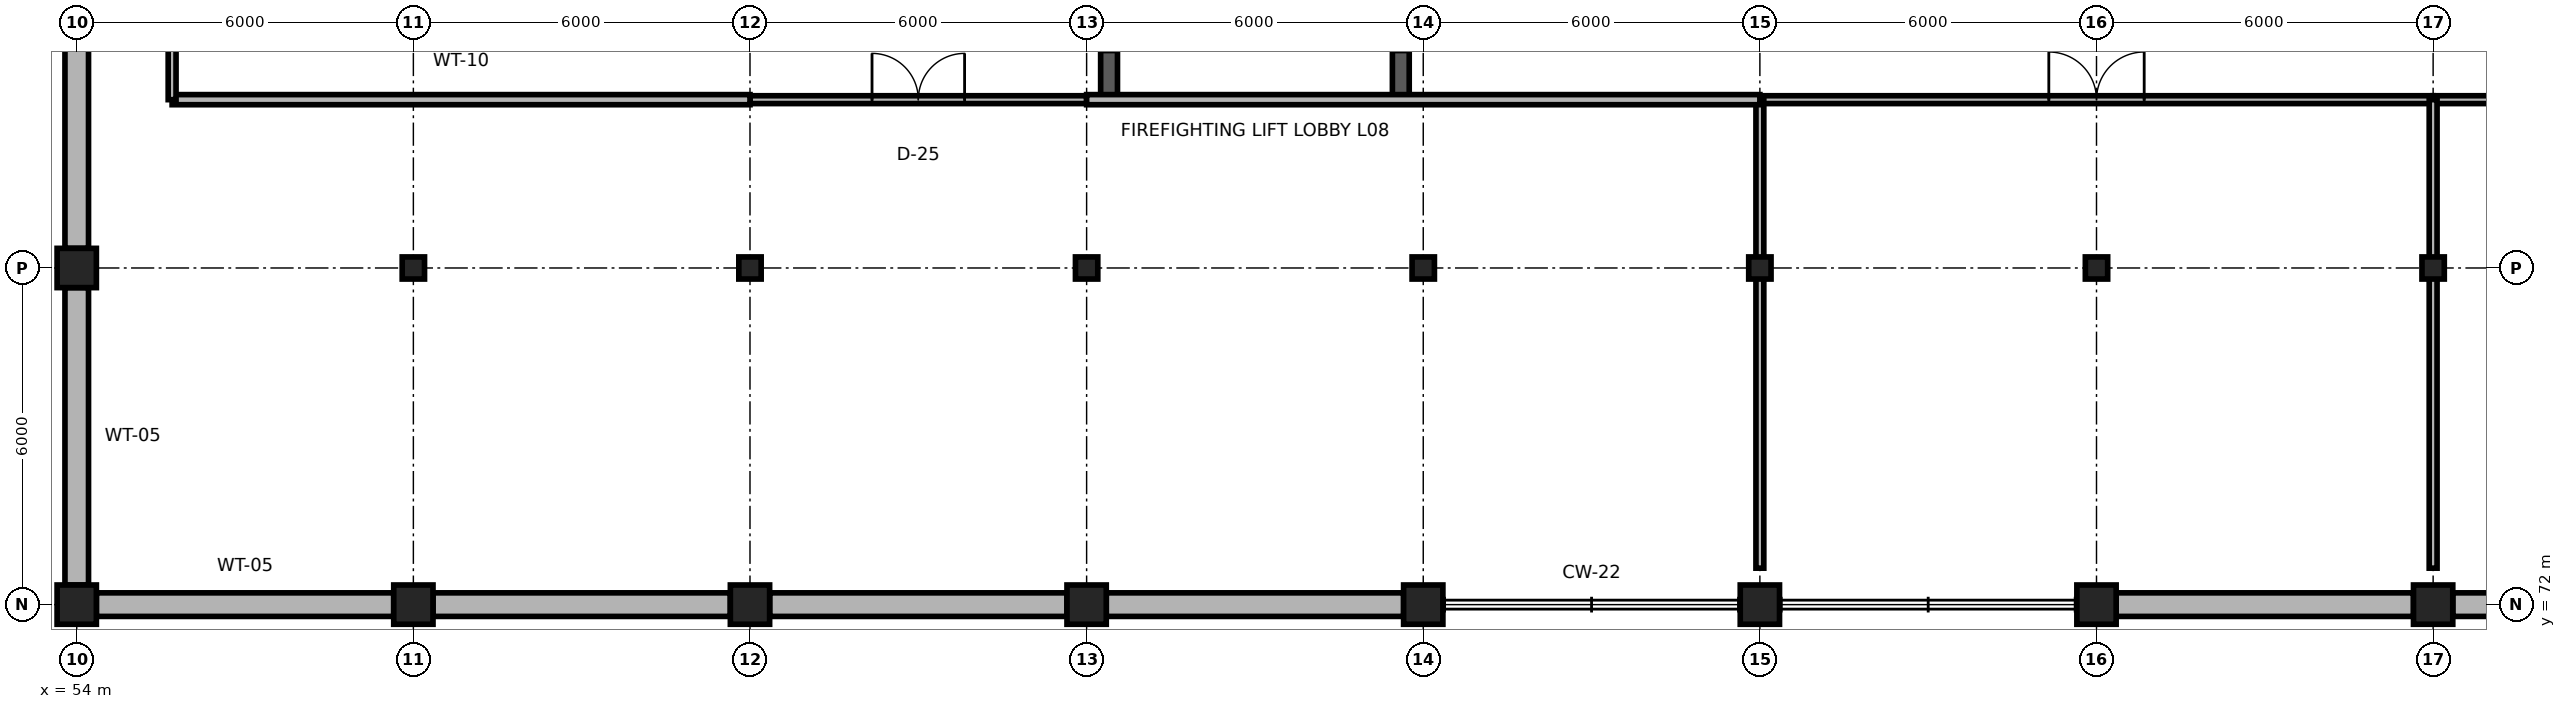
"""IFC4 building model, lengths in metres.
Left out: names, types, materials, properties, quantities, classifications, styles, units other than length and angle.
Written with IfcOpenShell. Run it as: python <this file> out.ifc"""

import sys

from ifc_helpers import new_model, si_unit, direction, frame, frame_2d, origin, origin_2d, place, context, subcontext, project, spatial, rectangle, i_section, extrude, element, fill, save


model = new_model("IFC4")
c1 = context("Model", 3, precision=1e-05, world=origin(), true_north=direction((0.0, 1.0)))
c2 = subcontext(c1, "Body", "Model", "MODEL_VIEW")
j1 = project(units=[si_unit("LENGTHUNIT", "METRE"), si_unit("PLANEANGLEUNIT", "RADIAN")], contexts=[c1])
p1 = place(None, origin())
s1 = spatial("IfcSite", under=j1, at=p1, CompositionType="ELEMENT")
p2 = place(p1, origin())
s2 = spatial("IfcBuilding", under=s1, at=p2, CompositionType="ELEMENT")
p3 = place(p2, frame((0.0, 0.0, 32.7)))
s3 = spatial("IfcBuildingStorey", under=s2, at=p3, CompositionType="ELEMENT", Elevation=32.7)
p4 = place(p3, frame((54.0, 72.0, 0.0), z_axis=(0.0, 0.0, 1.0), x_axis=(1.0, 0.0, 0.0)))
e1 = element("IfcColumn", 1, at=p4, inside=s3, PredefinedType="COLUMN", context=c2, shape_type="SweptSolid", body=[
    extrude(rectangle(XDim=0.7, YDim=0.7, at=origin_2d()), origin(), (0.0, 0.0, 1.0), 3.68),
])
for number, where, z_axis, x_axis in (
    (2, (60.0, 72.0, 0.0), (0.0, 0.0, 1.0), (1.0, 0.0, 0.0)),
    (3, (66.0, 72.0, 0.0), (0.0, 0.0, 1.0), (1.0, 0.0, 0.0)),
    (4, (72.0, 72.0, 0.0), (0.0, 0.0, 1.0), (1.0, 0.0, 0.0)),
    (5, (78.0, 72.0, 0.0), (0.0, 0.0, 1.0), (1.0, 0.0, 0.0)),
    (6, (84.0, 72.0, 0.0), (0.0, 0.0, 1.0), (1.0, 0.0, 0.0)),
    (7, (90.0, 72.0, 0.0), (0.0, 0.0, 1.0), (1.0, 0.0, 0.0)),
    (8, (96.0, 72.0, 0.0), (0.0, 0.0, 1.0), (1.0, 0.0, 0.0)),
):
    element("IfcColumn", number, at=place(p3, frame(where, z_axis=z_axis, x_axis=x_axis)), inside=s3, PredefinedType="COLUMN", context=c2, shape_type="SweptSolid", body=[
        extrude(rectangle(XDim=0.7, YDim=0.7, at=origin_2d()), origin(), (0.0, 0.0, 1.0), 3.9),
    ])
p5 = place(p3, frame((54.0, 78.0, 0.0), z_axis=(0.0, 0.0, 1.0), x_axis=(1.0, 0.0, 0.0)))
e9 = element("IfcColumn", 9, at=p5, inside=s3, PredefinedType="COLUMN", context=c2, shape_type="SweptSolid", body=[
    extrude(rectangle(XDim=0.7, YDim=0.7, at=origin_2d()), origin(), (0.0, 0.0, 1.0), 3.68),
])
for number, where, z_axis, x_axis in (
    (10, (60.0, 78.0, 0.0), (0.0, 0.0, 1.0), (1.0, 0.0, 0.0)),
    (11, (66.0, 78.0, 0.0), (0.0, 0.0, 1.0), (1.0, 0.0, 0.0)),
    (12, (72.0, 78.0, 0.0), (0.0, 0.0, 1.0), (1.0, 0.0, 0.0)),
    (13, (78.0, 78.0, 0.0), (0.0, 0.0, 1.0), (1.0, 0.0, 0.0)),
    (14, (84.0, 78.0, 0.0), (0.0, 0.0, 1.0), (1.0, 0.0, 0.0)),
    (15, (90.0, 78.0, 0.0), (0.0, 0.0, 1.0), (1.0, 0.0, 0.0)),
    (16, (96.0, 78.0, 0.0), (0.0, 0.0, 1.0), (1.0, 0.0, 0.0)),
):
    element("IfcColumn", number, at=place(p3, frame(where, z_axis=z_axis, x_axis=x_axis)), inside=s3, PredefinedType="COLUMN", context=c2, shape_type="SweptSolid", body=[
        extrude(i_section(OverallWidth=0.398, OverallDepth=0.394, WebThickness=0.011, FlangeThickness=0.018, FilletRadius=0.022, at=origin_2d()), origin(), (0.0, 0.0, 1.0), 3.9),
    ])
for number, where, z_axis, x_axis in (
    (17, (54.35, 72.0, 0.0), (0.0, 0.0, 1.0), (1.0, 0.0, 0.0)),
    (18, (60.35, 72.0, 0.0), (0.0, 0.0, 1.0), (1.0, 0.0, 0.0)),
    (19, (66.35, 72.0, 0.0), (0.0, 0.0, 1.0), (1.0, 0.0, 0.0)),
    (20, (72.35, 72.0, 0.0), (0.0, 0.0, 1.0), (1.0, 0.0, 0.0)),
    (21, (90.35, 72.0, 0.0), (0.0, 0.0, 1.0), (1.0, 0.0, 0.0)),
    (22, (96.35, 72.0, 0.0), (0.0, 0.0, 1.0), (1.0, 0.0, 0.0)),
    (23, (54.0, 72.35, 0.0), (0.0, 0.0, 1.0), (0.0, 1.0, 0.0)),
    (24, (54.0, 78.35, 0.0), (0.0, 0.0, 1.0), (0.0, 1.0, 0.0)),
):
    element("IfcWall", number, at=place(p3, frame(where, z_axis=z_axis, x_axis=x_axis)), inside=s3, PredefinedType="SOLIDWALL", context=c2, shape_type="SweptSolid", body=[
        extrude(rectangle(XDim=5.3, YDim=0.42, at=frame_2d((2.65, 0.0))), origin(), (0.0, 0.0, 1.0), 2.98),
    ])
p6 = place(p3, frame((72.4, 81.0, 0.0), z_axis=(0.0, 0.0, 1.0), x_axis=(0.0, 1.0, 0.0)))
e25 = element("IfcWall", 25, at=p6, inside=s3, PredefinedType="SHEAR", context=c2, shape_type="SweptSolid", body=[
    extrude(rectangle(XDim=3.0, YDim=0.3, at=frame_2d((1.5, 0.0))), origin(), (0.0, 0.0, 1.0), 3.4),
])
p7 = place(p6, frame((0.85, 0.0, 0.0)))
e26 = element("IfcOpeningElement", 26, at=p7, cuts=e25, PredefinedType="OPENING", context=c2, shape_type="SweptSolid", body=[
    extrude(rectangle(XDim=1.3, YDim=2.2, at=frame_2d((0.65, 1.1))), frame((0.0, 0.165, 0.0), z_axis=(0.0, -1.0, 0.0), x_axis=(1.0, 0.0, 0.0)), (0.0, 0.0, 1.0), 0.33),
])
p8 = place(p3, frame((77.6, 81.0, 0.0), z_axis=(0.0, 0.0, 1.0), x_axis=(0.0, 1.0, 0.0)))
e27 = element("IfcWall", 27, at=p8, inside=s3, PredefinedType="SHEAR", context=c2, shape_type="SweptSolid", body=[
    extrude(rectangle(XDim=3.0, YDim=0.3, at=frame_2d((1.5, 0.0))), origin(), (0.0, 0.0, 1.0), 3.4),
])
p9 = place(p8, frame((0.85, 0.0, 0.0)))
e28 = element("IfcOpeningElement", 28, at=p9, cuts=e27, PredefinedType="OPENING", context=c2, shape_type="SweptSolid", body=[
    extrude(rectangle(XDim=1.3, YDim=2.2, at=frame_2d((0.65, 1.1))), frame((0.0, 0.165, 0.0), z_axis=(0.0, -1.0, 0.0), x_axis=(1.0, 0.0, 0.0)), (0.0, 0.0, 1.0), 0.33),
])
p10 = place(p3, frame((66.0, 81.0, 0.0), z_axis=(0.0, 0.0, 1.0), x_axis=(1.0, 0.0, 0.0)))
e29 = element("IfcWall", 29, at=p10, inside=s3, PredefinedType="PARTITIONING", context=c2, shape_type="SweptSolid", body=[
    extrude(rectangle(XDim=6.0, YDim=0.14, at=frame_2d((3.0, 0.0))), origin(), (0.0, 0.0, 1.0), 3.4),
])
p11 = place(p10, frame((2.175, 0.0, 0.0)))
e30 = element("IfcOpeningElement", 30, at=p11, cuts=e29, PredefinedType="OPENING", context=c2, shape_type="SweptSolid", body=[
    extrude(rectangle(XDim=1.65, YDim=2.35, at=frame_2d((0.825, 1.175))), frame((0.0, 0.085, 0.0), z_axis=(0.0, -1.0, 0.0), x_axis=(1.0, 0.0, 0.0)), (0.0, 0.0, 1.0), 0.17),
])
p12 = place(p3, frame((84.0, 81.0, 0.0), z_axis=(0.0, 0.0, 1.0), x_axis=(1.0, 0.0, 0.0)))
e31 = element("IfcWall", 31, at=p12, inside=s3, PredefinedType="PARTITIONING", context=c2, shape_type="SweptSolid", body=[
    extrude(rectangle(XDim=12.0, YDim=0.14, at=frame_2d((6.0, 0.0))), origin(), (0.0, 0.0, 1.0), 3.4),
])
p13 = place(p12, frame((5.15, 0.0, 0.0)))
e32 = element("IfcOpeningElement", 32, at=p13, cuts=e31, PredefinedType="OPENING", context=c2, shape_type="SweptSolid", body=[
    extrude(rectangle(XDim=1.7, YDim=2.45, at=frame_2d((0.85, 1.225))), frame((0.0, 0.085, 0.0), z_axis=(0.0, -1.0, 0.0), x_axis=(1.0, 0.0, 0.0)), (0.0, 0.0, 1.0), 0.17),
])
p14 = place(p3, frame((96.0, 81.0, 0.0), z_axis=(0.0, 0.0, 1.0), x_axis=(1.0, 0.0, 0.0)))
e33 = element("IfcWall", 33, at=p14, inside=s3, PredefinedType="PARTITIONING", context=c2, shape_type="SweptSolid", body=[
    extrude(rectangle(XDim=12.0, YDim=0.14, at=frame_2d((6.0, 0.0))), origin(), (0.0, 0.0, 1.0), 3.4),
])
p15 = place(p14, frame((5.15, 0.0, 0.0)))
e34 = element("IfcOpeningElement", 34, at=p15, cuts=e33, PredefinedType="OPENING", context=c2, shape_type="SweptSolid", body=[
    extrude(rectangle(XDim=1.7, YDim=2.45, at=frame_2d((0.85, 1.225))), frame((0.0, 0.085, 0.0), z_axis=(0.0, -1.0, 0.0), x_axis=(1.0, 0.0, 0.0)), (0.0, 0.0, 1.0), 0.17),
])
for number, where, z_axis, x_axis in (
    (35, (84.0, 72.65, 0.0), (0.0, 0.0, 1.0), (0.0, 1.0, 0.0)),
    (36, (96.0, 72.65, 0.0), (0.0, 0.0, 1.0), (0.0, 1.0, 0.0)),
):
    element("IfcWall", number, at=place(p3, frame(where, z_axis=z_axis, x_axis=x_axis)), inside=s3, PredefinedType="PARTITIONING", context=c2, shape_type="SweptSolid", body=[
        extrude(rectangle(XDim=8.35, YDim=0.14, at=frame_2d((4.175, 0.0))), origin(), (0.0, 0.0, 1.0), 3.012),
    ])
p16 = place(p3, frame((55.7, 81.0, 0.0), z_axis=(0.0, 0.0, 1.0), x_axis=(1.0, 0.0, 0.0)))
e37 = element("IfcWall", 37, at=p16, inside=s3, PredefinedType="PARTITIONING", context=c2, shape_type="SweptSolid", body=[
    extrude(rectangle(XDim=10.3, YDim=0.18, at=frame_2d((5.15, 0.0))), origin(), (0.0, 0.0, 1.0), 3.4),
])
p17 = place(p3, frame((72.0, 81.0, 0.0), z_axis=(0.0, 0.0, 1.0), x_axis=(1.0, 0.0, 0.0)))
e38 = element("IfcWall", 38, at=p17, inside=s3, PredefinedType="PARTITIONING", context=c2, shape_type="SweptSolid", body=[
    extrude(rectangle(XDim=12.0, YDim=0.18, at=frame_2d((6.0, 0.0))), origin(), (0.0, 0.0, 1.0), 3.4),
])
p18 = place(p3, frame((55.7, 81.0, 0.0), z_axis=(0.0, 0.0, 1.0), x_axis=(0.0, 1.0, 0.0)))
e39 = element("IfcWall", 39, at=p18, inside=s3, PredefinedType="PARTITIONING", context=c2, shape_type="SweptSolid", body=[
    extrude(rectangle(XDim=1.15, YDim=0.14, at=frame_2d((0.575, 0.0))), origin(), (0.0, 0.0, 1.0), 3.4),
])
p19 = place(p11, origin())
e40 = element("IfcDoor", 40, at=p19, inside=s3, OperationType="DOUBLE_DOOR_SINGLE_SWING", PredefinedType="DOOR", context=c2, shape_type="SweptSolid", body=[
    extrude(rectangle(XDim=1.65, YDim=2.35, at=frame_2d((0.825, 1.175))), frame((0.0, 0.025, 0.0), z_axis=(0.0, -1.0, 0.0), x_axis=(1.0, 0.0, 0.0)), (0.0, 0.0, 1.0), 0.05),
])
fill(e30, e40)
p20 = place(p13, origin())
e41 = element("IfcDoor", 41, at=p20, inside=s3, OperationType="DOUBLE_DOOR_SINGLE_SWING", PredefinedType="DOOR", context=c2, shape_type="SweptSolid", body=[
    extrude(rectangle(XDim=1.7, YDim=2.45, at=frame_2d((0.85, 1.225))), frame((0.0, 0.025, 0.0), z_axis=(0.0, -1.0, 0.0), x_axis=(1.0, 0.0, 0.0)), (0.0, 0.0, 1.0), 0.05),
])
fill(e32, e41)
save(model, sys.argv[1])
